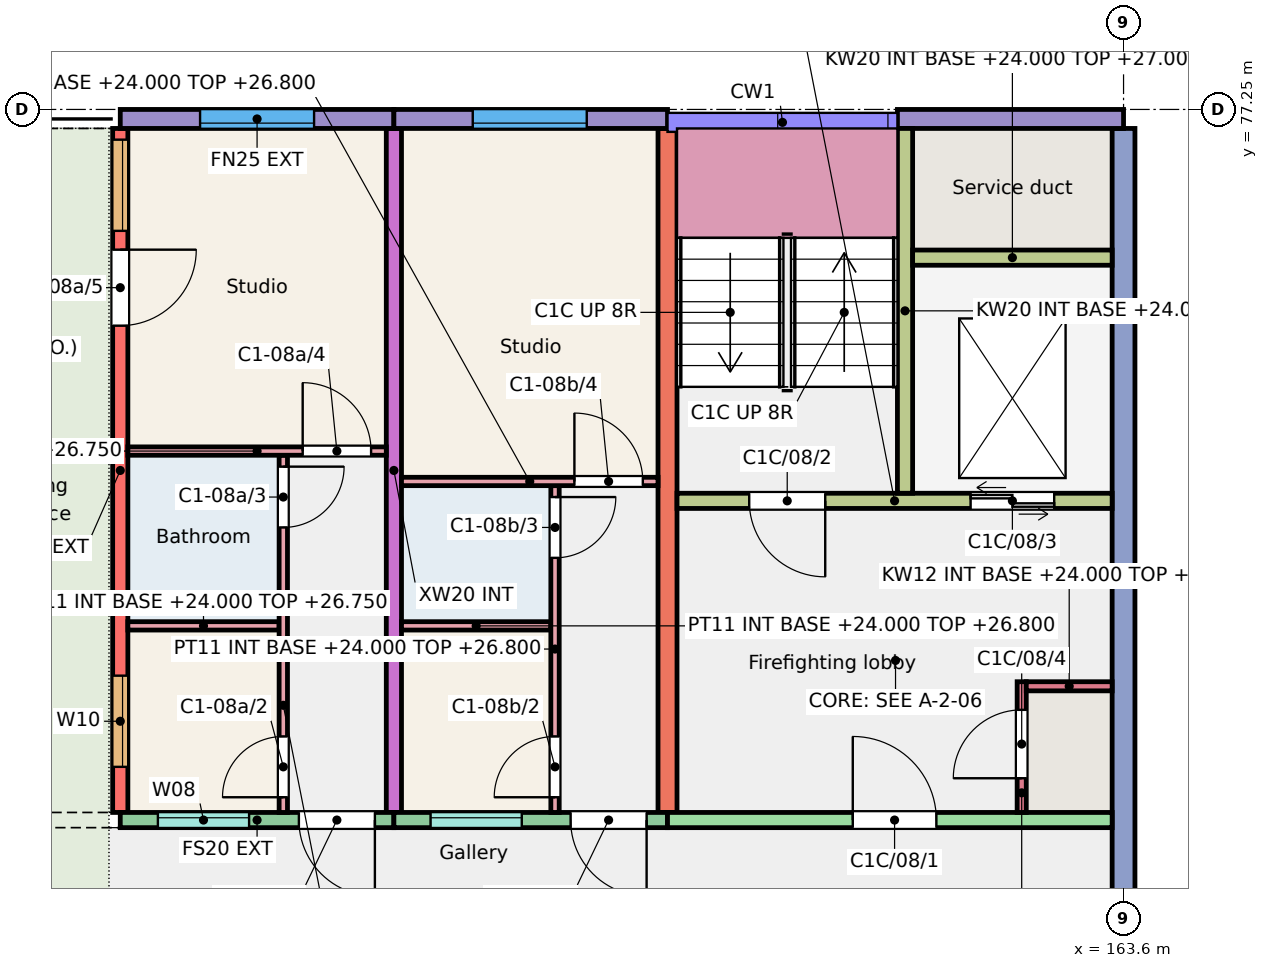
"""IFC4 building model, lengths in metres.
Left out: names, types, materials, properties, quantities, classifications, styles, units other than length and angle.
Written with IfcOpenShell. Run it as: python <this file> out.ifc"""

import sys

from ifc_helpers import new_model, si_unit, direction, frame, frame_2d, origin, place, context, subcontext, project, spatial, rectangle, extrude, element, fill, save


model = new_model("IFC4")
c1 = context("Model", 3, precision=1e-05, world=origin(), true_north=direction((0.0, 1.0)))
c2 = subcontext(c1, "Body", "Model", "MODEL_VIEW")
j1 = project(units=[si_unit("LENGTHUNIT", "METRE"), si_unit("PLANEANGLEUNIT", "RADIAN")], contexts=[c1])
p1 = place(None, origin())
s1 = spatial("IfcSite", under=j1, at=p1, CompositionType="ELEMENT")
p2 = place(p1, origin())
s2 = spatial("IfcBuilding", under=s1, at=p2, CompositionType="ELEMENT")
p3 = place(p2, frame((0.0, 0.0, 24.0)))
s3 = spatial("IfcBuildingStorey", under=s2, at=p3, CompositionType="ELEMENT", Elevation=24.0)
p4 = place(p3, frame((150.4, 68.0, 0.0), z_axis=(0.0, 0.0, 1.0), x_axis=(0.0, 1.0, 0.0)))
e1 = element("IfcWall", 1, at=p4, inside=s3, PredefinedType="SHEAR", context=c2, shape_type="SweptSolid", body=[
    extrude(rectangle(XDim=9.0, YDim=0.2, at=frame_2d((4.5, 0.0))), origin(), (0.0, 0.0, 1.0), 3.0),
])
p5 = place(p4, frame((0.6, 0.0, 0.9)))
e2 = element("IfcOpeningElement", 2, at=p5, cuts=e1, PredefinedType="OPENING", context=c2, shape_type="SweptSolid", body=[
    extrude(rectangle(XDim=1.2, YDim=1.5, at=frame_2d((0.6, 0.75))), frame((0.0, 0.11, 0.0), z_axis=(0.0, -1.0, 0.0), x_axis=(1.0, 0.0, 0.0)), (0.0, 0.0, 1.0), 0.22),
])
p6 = place(p4, frame((7.653, 0.0, 0.9)))
e3 = element("IfcOpeningElement", 3, at=p6, cuts=e1, PredefinedType="OPENING", context=c2, shape_type="SweptSolid", body=[
    extrude(rectangle(XDim=1.2, YDim=1.5, at=frame_2d((0.6, 0.75))), frame((0.0, 0.11, 0.0), z_axis=(0.0, -1.0, 0.0), x_axis=(1.0, 0.0, 0.0)), (0.0, 0.0, 1.0), 0.22),
])
p7 = place(p4, frame((6.405, 0.0, 0.0)))
e4 = element("IfcOpeningElement", 4, at=p7, cuts=e1, PredefinedType="OPENING", context=c2, shape_type="SweptSolid", body=[
    extrude(rectangle(XDim=1.0, YDim=2.1, at=frame_2d((0.5, 1.05))), frame((0.0, 0.11, 0.0), z_axis=(0.0, -1.0, 0.0), x_axis=(1.0, 0.0, 0.0)), (0.0, 0.0, 1.0), 0.22),
])
p8 = place(p3, frame((154.0, 68.0, 0.0), z_axis=(0.0, 0.0, 1.0), x_axis=(0.0, 1.0, 0.0)))
e5 = element("IfcWall", 5, at=p8, inside=s3, PredefinedType="SHEAR", context=c2, shape_type="SweptSolid", body=[
    extrude(rectangle(XDim=9.0, YDim=0.2, at=frame_2d((4.5, 0.0))), origin(), (0.0, 0.0, 1.0), 3.0),
])
p9 = place(p3, frame((157.6, 68.0, 0.0), z_axis=(0.0, 0.0, 1.0), x_axis=(0.0, 1.0, 0.0)))
e6 = element("IfcWall", 6, at=p9, inside=s3, PredefinedType="SHEAR", context=c2, shape_type="SweptSolid", body=[
    extrude(rectangle(XDim=9.0, YDim=0.25, at=frame_2d((4.5, 0.0))), origin(), (0.0, 0.0, 1.0), 3.0),
])
p10 = place(p3, frame((163.6, 66.0, 0.0), z_axis=(0.0, 0.0, 1.0), x_axis=(0.0, 1.0, 0.0)))
e7 = element("IfcWall", 7, at=p10, inside=s3, PredefinedType="SHEAR", context=c2, shape_type="SweptSolid", body=[
    extrude(rectangle(XDim=11.0, YDim=0.3, at=frame_2d((5.5, 0.0))), origin(), (0.0, 0.0, 1.0), 3.0),
])
p11 = place(p3, frame((150.4, 77.125, 0.0), z_axis=(0.0, 0.0, 1.0), x_axis=(1.0, 0.0, 0.0)))
e8 = element("IfcWall", 8, at=p11, inside=s3, PredefinedType="SOLIDWALL", context=c2, shape_type="SweptSolid", body=[
    extrude(rectangle(XDim=3.6, YDim=0.25, at=frame_2d((1.8, 0.0))), origin(), (0.0, 0.0, 1.0), 3.0),
])
p12 = place(p11, frame((1.05, 0.0, 0.9)))
e9 = element("IfcOpeningElement", 9, at=p12, cuts=e8, PredefinedType="OPENING", context=c2, shape_type="SweptSolid", body=[
    extrude(rectangle(XDim=1.5, YDim=1.5, at=frame_2d((0.75, 0.75))), frame((0.0, 0.135, 0.0), z_axis=(0.0, -1.0, 0.0), x_axis=(1.0, 0.0, 0.0)), (0.0, 0.0, 1.0), 0.27),
])
p13 = place(p3, frame((150.4, 67.9, 0.0), z_axis=(0.0, 0.0, 1.0), x_axis=(1.0, 0.0, 0.0)))
e10 = element("IfcWall", 10, at=p13, inside=s3, PredefinedType="SOLIDWALL", context=c2, shape_type="SweptSolid", body=[
    extrude(rectangle(XDim=3.6, YDim=0.2, at=frame_2d((1.8, 0.0))), origin(), (0.0, 0.0, 1.0), 3.0),
])
p14 = place(p13, frame((0.495, 0.0, 1.1)))
e11 = element("IfcOpeningElement", 11, at=p14, cuts=e10, PredefinedType="OPENING", context=c2, shape_type="SweptSolid", body=[
    extrude(rectangle(XDim=1.2, YDim=1.3, at=frame_2d((0.6, 0.65))), frame((0.0, 0.11, 0.0), z_axis=(0.0, -1.0, 0.0), x_axis=(1.0, 0.0, 0.0)), (0.0, 0.0, 1.0), 0.22),
])
p15 = place(p13, frame((2.35, 0.0, 0.0)))
e12 = element("IfcOpeningElement", 12, at=p15, cuts=e10, PredefinedType="OPENING", context=c2, shape_type="SweptSolid", body=[
    extrude(rectangle(XDim=1.0, YDim=2.1, at=frame_2d((0.5, 1.05))), frame((0.0, 0.11, 0.0), z_axis=(0.0, -1.0, 0.0), x_axis=(1.0, 0.0, 0.0)), (0.0, 0.0, 1.0), 0.22),
])
p16 = place(p3, frame((154.0, 77.125, 0.0), z_axis=(0.0, 0.0, 1.0), x_axis=(1.0, 0.0, 0.0)))
e13 = element("IfcWall", 13, at=p16, inside=s3, PredefinedType="SOLIDWALL", context=c2, shape_type="SweptSolid", body=[
    extrude(rectangle(XDim=3.6, YDim=0.25, at=frame_2d((1.8, 0.0))), origin(), (0.0, 0.0, 1.0), 3.0),
])
p17 = place(p16, frame((1.038, 0.0, 0.9)))
e14 = element("IfcOpeningElement", 14, at=p17, cuts=e13, PredefinedType="OPENING", context=c2, shape_type="SweptSolid", body=[
    extrude(rectangle(XDim=1.5, YDim=1.5, at=frame_2d((0.75, 0.75))), frame((0.0, 0.135, 0.0), z_axis=(0.0, -1.0, 0.0), x_axis=(1.0, 0.0, 0.0)), (0.0, 0.0, 1.0), 0.27),
])
p18 = place(p3, frame((154.0, 67.9, 0.0), z_axis=(0.0, 0.0, 1.0), x_axis=(1.0, 0.0, 0.0)))
e15 = element("IfcWall", 15, at=p18, inside=s3, PredefinedType="SOLIDWALL", context=c2, shape_type="SweptSolid", body=[
    extrude(rectangle(XDim=3.6, YDim=0.2, at=frame_2d((1.8, 0.0))), origin(), (0.0, 0.0, 1.0), 3.0),
])
p19 = place(p18, frame((0.482, 0.0, 1.1)))
e16 = element("IfcOpeningElement", 16, at=p19, cuts=e15, PredefinedType="OPENING", context=c2, shape_type="SweptSolid", body=[
    extrude(rectangle(XDim=1.2, YDim=1.3, at=frame_2d((0.6, 0.65))), frame((0.0, 0.11, 0.0), z_axis=(0.0, -1.0, 0.0), x_axis=(1.0, 0.0, 0.0)), (0.0, 0.0, 1.0), 0.22),
])
p20 = place(p18, frame((2.325, 0.0, 0.0)))
e17 = element("IfcOpeningElement", 17, at=p20, cuts=e15, PredefinedType="OPENING", context=c2, shape_type="SweptSolid", body=[
    extrude(rectangle(XDim=1.0, YDim=2.1, at=frame_2d((0.5, 1.05))), frame((0.0, 0.11, 0.0), z_axis=(0.0, -1.0, 0.0), x_axis=(1.0, 0.0, 0.0)), (0.0, 0.0, 1.0), 0.22),
])
p21 = place(p3, frame((160.625, 77.125, 0.0), z_axis=(0.0, 0.0, 1.0), x_axis=(1.0, 0.0, 0.0)))
e18 = element("IfcWall", 18, at=p21, inside=s3, PredefinedType="SOLIDWALL", context=c2, shape_type="SweptSolid", body=[
    extrude(rectangle(XDim=2.975, YDim=0.25, at=frame_2d((1.488, 0.0))), origin(), (0.0, 0.0, 1.0), 3.0),
])
p22 = place(p3, frame((157.6, 67.9, 0.0), z_axis=(0.0, 0.0, 1.0), x_axis=(1.0, 0.0, 0.0)))
e19 = element("IfcWall", 19, at=p22, inside=s3, PredefinedType="SHEAR", context=c2, shape_type="SweptSolid", body=[
    extrude(rectangle(XDim=5.85, YDim=0.2, at=frame_2d((2.925, 0.0))), origin(), (0.0, 0.0, 1.0), 3.0),
])
p23 = place(p22, frame((2.438, 0.0, 0.0)))
e20 = element("IfcOpeningElement", 20, at=p23, cuts=e19, PredefinedType="OPENING", context=c2, shape_type="SweptSolid", body=[
    extrude(rectangle(XDim=1.1, YDim=2.1, at=frame_2d((0.55, 1.05))), frame((0.0, 0.11, 0.0), z_axis=(0.0, -1.0, 0.0), x_axis=(1.0, 0.0, 0.0)), (0.0, 0.0, 1.0), 0.22),
])
p24 = place(p3, frame((157.725, 72.1, 0.0), z_axis=(0.0, 0.0, 1.0), x_axis=(1.0, 0.0, 0.0)))
e21 = element("IfcWall", 21, at=p24, inside=s3, PredefinedType="SHEAR", context=c2, shape_type="SweptSolid", body=[
    extrude(rectangle(XDim=5.725, YDim=0.2, at=frame_2d((2.862, 0.0))), origin(), (0.0, 0.0, 1.0), 3.0),
])
p25 = place(p24, frame((0.95, 0.0, 0.0)))
e22 = element("IfcOpeningElement", 22, at=p25, cuts=e21, PredefinedType="OPENING", context=c2, shape_type="SweptSolid", body=[
    extrude(rectangle(XDim=1.0, YDim=2.1, at=frame_2d((0.5, 1.05))), frame((0.0, 0.11, 0.0), z_axis=(0.0, -1.0, 0.0), x_axis=(1.0, 0.0, 0.0)), (0.0, 0.0, 1.0), 0.22),
])
p26 = place(p24, frame((3.863, 0.0, 0.0)))
e23 = element("IfcOpeningElement", 23, at=p26, cuts=e21, PredefinedType="OPENING", context=c2, shape_type="SweptSolid", body=[
    extrude(rectangle(XDim=1.1, YDim=2.1, at=frame_2d((0.55, 1.05))), frame((0.0, 0.11, 0.0), z_axis=(0.0, -1.0, 0.0), x_axis=(1.0, 0.0, 0.0)), (0.0, 0.0, 1.0), 0.22),
])
p27 = place(p3, frame((160.725, 72.2, 0.0), z_axis=(0.0, 0.0, 1.0), x_axis=(0.0, 1.0, 0.0)))
e24 = element("IfcWall", 24, at=p27, inside=s3, PredefinedType="SHEAR", context=c2, shape_type="SweptSolid", body=[
    extrude(rectangle(XDim=4.8, YDim=0.2, at=frame_2d((2.4, 0.0))), origin(), (0.0, 0.0, 1.0), 3.0),
])
p28 = place(p3, frame((160.825, 75.3, 0.0), z_axis=(0.0, 0.0, 1.0), x_axis=(1.0, 0.0, 0.0)))
e25 = element("IfcWall", 25, at=p28, inside=s3, PredefinedType="SHEAR", context=c2, shape_type="SweptSolid", body=[
    extrude(rectangle(XDim=2.625, YDim=0.2, at=frame_2d((1.312, 0.0))), origin(), (0.0, 0.0, 1.0), 3.0),
])
p29 = place(p3, frame((162.26, 68.0, 0.0), z_axis=(0.0, 0.0, 1.0), x_axis=(0.0, 1.0, 0.0)))
e26 = element("IfcWall", 26, at=p29, inside=s3, PredefinedType="SHEAR", context=c2, shape_type="SweptSolid", body=[
    extrude(rectangle(XDim=1.72, YDim=0.12, at=frame_2d((0.86, 0.0))), origin(), (0.0, 0.0, 1.0), 3.0),
])
p30 = place(p29, frame((0.45, 0.0, 0.0)))
e27 = element("IfcOpeningElement", 27, at=p30, cuts=e26, PredefinedType="OPENING", context=c2, shape_type="SweptSolid", body=[
    extrude(rectangle(XDim=0.9, YDim=2.1, at=frame_2d((0.45, 1.05))), frame((0.0, 0.07, 0.0), z_axis=(0.0, -1.0, 0.0), x_axis=(1.0, 0.0, 0.0)), (0.0, 0.0, 1.0), 0.14),
])
p31 = place(p3, frame((162.32, 69.66, 0.0), z_axis=(0.0, 0.0, 1.0), x_axis=(1.0, 0.0, 0.0)))
e28 = element("IfcWall", 28, at=p31, inside=s3, PredefinedType="SHEAR", context=c2, shape_type="SweptSolid", body=[
    extrude(rectangle(XDim=1.13, YDim=0.12, at=frame_2d((0.565, 0.0))), origin(), (0.0, 0.0, 1.0), 3.0),
])
p32 = place(p3, frame((150.5, 70.455, 0.0), z_axis=(0.0, 0.0, 1.0), x_axis=(1.0, 0.0, 0.0)))
e29 = element("IfcWall", 29, at=p32, inside=s3, PredefinedType="PARTITIONING", context=c2, shape_type="SweptSolid", body=[
    extrude(rectangle(XDim=1.99, YDim=0.11, at=frame_2d((0.995, 0.0))), origin(), (0.0, 0.0, 1.0), 2.75),
])
p33 = place(p3, frame((152.545, 68.0, 0.0), z_axis=(0.0, 0.0, 1.0), x_axis=(0.0, 1.0, 0.0)))
e30 = element("IfcWall", 30, at=p33, inside=s3, PredefinedType="PARTITIONING", context=c2, shape_type="SweptSolid", body=[
    extrude(rectangle(XDim=4.7, YDim=0.11, at=frame_2d((2.35, 0.0))), origin(), (0.0, 0.0, 1.0), 2.75),
])
p34 = place(p33, frame((0.2, 0.0, 0.0)))
e31 = element("IfcOpeningElement", 31, at=p34, cuts=e30, PredefinedType="OPENING", context=c2, shape_type="SweptSolid", body=[
    extrude(rectangle(XDim=0.8, YDim=2.1, at=frame_2d((0.4, 1.05))), frame((0.0, 0.065, 0.0), z_axis=(0.0, -1.0, 0.0), x_axis=(1.0, 0.0, 0.0)), (0.0, 0.0, 1.0), 0.13),
])
p35 = place(p33, frame((3.75, 0.0, 0.0)))
e32 = element("IfcOpeningElement", 32, at=p35, cuts=e30, PredefinedType="OPENING", context=c2, shape_type="SweptSolid", body=[
    extrude(rectangle(XDim=0.8, YDim=2.1, at=frame_2d((0.4, 1.05))), frame((0.0, 0.065, 0.0), z_axis=(0.0, -1.0, 0.0), x_axis=(1.0, 0.0, 0.0)), (0.0, 0.0, 1.0), 0.13),
])
p36 = place(p3, frame((150.5, 72.755, 0.0), z_axis=(0.0, 0.0, 1.0), x_axis=(1.0, 0.0, 0.0)))
e33 = element("IfcWall", 33, at=p36, inside=s3, PredefinedType="PARTITIONING", context=c2, shape_type="SweptSolid", body=[
    extrude(rectangle(XDim=3.4, YDim=0.11, at=frame_2d((1.7, 0.0))), origin(), (0.0, 0.0, 1.0), 2.75),
])
p37 = place(p36, frame((2.3, 0.0, 0.0)))
e34 = element("IfcOpeningElement", 34, at=p37, cuts=e33, PredefinedType="OPENING", context=c2, shape_type="SweptSolid", body=[
    extrude(rectangle(XDim=0.9, YDim=2.1, at=frame_2d((0.45, 1.05))), frame((0.0, 0.065, 0.0), z_axis=(0.0, -1.0, 0.0), x_axis=(1.0, 0.0, 0.0)), (0.0, 0.0, 1.0), 0.13),
])
p38 = place(p3, frame((154.1, 70.455, 0.0), z_axis=(0.0, 0.0, 1.0), x_axis=(1.0, 0.0, 0.0)))
e35 = element("IfcWall", 35, at=p38, inside=s3, PredefinedType="PARTITIONING", context=c2, shape_type="SweptSolid", body=[
    extrude(rectangle(XDim=1.965, YDim=0.11, at=frame_2d((0.982, 0.0))), origin(), (0.0, 0.0, 1.0), 2.8),
])
p39 = place(p3, frame((156.12, 68.0, 0.0), z_axis=(0.0, 0.0, 1.0), x_axis=(0.0, 1.0, 0.0)))
e36 = element("IfcWall", 36, at=p39, inside=s3, PredefinedType="PARTITIONING", context=c2, shape_type="SweptSolid", body=[
    extrude(rectangle(XDim=4.3, YDim=0.11, at=frame_2d((2.15, 0.0))), origin(), (0.0, 0.0, 1.0), 2.8),
])
p40 = place(p39, frame((0.2, 0.0, 0.0)))
e37 = element("IfcOpeningElement", 37, at=p40, cuts=e36, PredefinedType="OPENING", context=c2, shape_type="SweptSolid", body=[
    extrude(rectangle(XDim=0.8, YDim=2.1, at=frame_2d((0.4, 1.05))), frame((0.0, 0.065, 0.0), z_axis=(0.0, -1.0, 0.0), x_axis=(1.0, 0.0, 0.0)), (0.0, 0.0, 1.0), 0.13),
])
p41 = place(p39, frame((3.35, 0.0, 0.0)))
e38 = element("IfcOpeningElement", 38, at=p41, cuts=e36, PredefinedType="OPENING", context=c2, shape_type="SweptSolid", body=[
    extrude(rectangle(XDim=0.8, YDim=2.1, at=frame_2d((0.4, 1.05))), frame((0.0, 0.065, 0.0), z_axis=(0.0, -1.0, 0.0), x_axis=(1.0, 0.0, 0.0)), (0.0, 0.0, 1.0), 0.13),
])
p42 = place(p3, frame((154.1, 72.355, 0.0), z_axis=(0.0, 0.0, 1.0), x_axis=(1.0, 0.0, 0.0)))
e39 = element("IfcWall", 39, at=p42, inside=s3, PredefinedType="PARTITIONING", context=c2, shape_type="SweptSolid", body=[
    extrude(rectangle(XDim=3.375, YDim=0.11, at=frame_2d((1.688, 0.0))), origin(), (0.0, 0.0, 1.0), 2.8),
])
p43 = place(p42, frame((2.275, 0.0, 0.0)))
e40 = element("IfcOpeningElement", 40, at=p43, cuts=e39, PredefinedType="OPENING", context=c2, shape_type="SweptSolid", body=[
    extrude(rectangle(XDim=0.9, YDim=2.1, at=frame_2d((0.45, 1.05))), frame((0.0, 0.065, 0.0), z_axis=(0.0, -1.0, 0.0), x_axis=(1.0, 0.0, 0.0)), (0.0, 0.0, 1.0), 0.13),
])
p44 = place(p14, origin())
e41 = element("IfcWindow", 41, at=p44, inside=s3, PartitioningType="SINGLE_PANEL", PredefinedType="WINDOW", context=c2, shape_type="SweptSolid", body=[
    extrude(rectangle(XDim=1.2, YDim=1.3, at=frame_2d((0.6, 0.65))), frame((0.0, 0.06, 0.0), z_axis=(0.0, -1.0, 0.0), x_axis=(1.0, 0.0, 0.0)), (0.0, 0.0, 1.0), 0.06),
])
fill(e11, e41)
p45 = place(p12, origin())
e42 = element("IfcWindow", 42, at=p45, inside=s3, PartitioningType="SINGLE_PANEL", PredefinedType="WINDOW", context=c2, shape_type="SweptSolid", body=[
    extrude(rectangle(XDim=1.5, YDim=1.5, at=frame_2d((0.75, 0.75))), frame((0.0, -0.025, 0.0), z_axis=(0.0, -1.0, 0.0), x_axis=(1.0, 0.0, 0.0)), (0.0, 0.0, 1.0), 0.06),
])
fill(e9, e42)
p46 = place(p5, origin())
e43 = element("IfcWindow", 43, at=p46, inside=s3, PartitioningType="SINGLE_PANEL", PredefinedType="WINDOW", context=c2, shape_type="SweptSolid", body=[
    extrude(rectangle(XDim=1.2, YDim=1.5, at=frame_2d((0.6, 0.75))), frame((0.0, 0.0, 0.0), z_axis=(0.0, -1.0, 0.0), x_axis=(1.0, 0.0, 0.0)), (0.0, 0.0, 1.0), 0.06),
])
fill(e2, e43)
p47 = place(p6, origin())
e44 = element("IfcWindow", 44, at=p47, inside=s3, PartitioningType="SINGLE_PANEL", PredefinedType="WINDOW", context=c2, shape_type="SweptSolid", body=[
    extrude(rectangle(XDim=1.2, YDim=1.5, at=frame_2d((0.6, 0.75))), frame((0.0, 0.0, 0.0), z_axis=(0.0, -1.0, 0.0), x_axis=(1.0, 0.0, 0.0)), (0.0, 0.0, 1.0), 0.06),
])
fill(e3, e44)
p48 = place(p19, origin())
e45 = element("IfcWindow", 45, at=p48, inside=s3, PartitioningType="SINGLE_PANEL", PredefinedType="WINDOW", context=c2, shape_type="SweptSolid", body=[
    extrude(rectangle(XDim=1.2, YDim=1.3, at=frame_2d((0.6, 0.65))), frame((0.0, 0.06, 0.0), z_axis=(0.0, -1.0, 0.0), x_axis=(1.0, 0.0, 0.0)), (0.0, 0.0, 1.0), 0.06),
])
fill(e16, e45)
p49 = place(p17, origin())
e46 = element("IfcWindow", 46, at=p49, inside=s3, PartitioningType="SINGLE_PANEL", PredefinedType="WINDOW", context=c2, shape_type="SweptSolid", body=[
    extrude(rectangle(XDim=1.5, YDim=1.5, at=frame_2d((0.75, 0.75))), frame((0.0, -0.025, 0.0), z_axis=(0.0, -1.0, 0.0), x_axis=(1.0, 0.0, 0.0)), (0.0, 0.0, 1.0), 0.06),
])
fill(e14, e46)
p50 = place(p15, origin())
e47 = element("IfcDoor", 47, at=p50, inside=s3, OperationType="SINGLE_SWING_RIGHT", PredefinedType="DOOR", context=c2, shape_type="SweptSolid", body=[
    extrude(rectangle(XDim=1.0, YDim=2.1, at=frame_2d((0.5, 1.05))), frame((0.0, 0.025, 0.0), z_axis=(0.0, -1.0, 0.0), x_axis=(1.0, 0.0, 0.0)), (0.0, 0.0, 1.0), 0.05),
])
fill(e12, e47)
p51 = place(p34, origin())
e48 = element("IfcDoor", 48, at=p51, inside=s3, OperationType="SINGLE_SWING_LEFT", PredefinedType="DOOR", context=c2, shape_type="SweptSolid", body=[
    extrude(rectangle(XDim=0.8, YDim=2.1, at=frame_2d((0.4, 1.05))), frame((0.0, 0.025, 0.0), z_axis=(0.0, -1.0, 0.0), x_axis=(1.0, 0.0, 0.0)), (0.0, 0.0, 1.0), 0.05),
])
fill(e31, e48)
p52 = place(p35, origin())
e49 = element("IfcDoor", 49, at=p52, inside=s3, OperationType="SINGLE_SWING_RIGHT", PredefinedType="DOOR", context=c2, shape_type="SweptSolid", body=[
    extrude(rectangle(XDim=0.8, YDim=2.1, at=frame_2d((0.4, 1.05))), frame((0.0, 0.025, 0.0), z_axis=(0.0, -1.0, 0.0), x_axis=(1.0, 0.0, 0.0)), (0.0, 0.0, 1.0), 0.05),
])
fill(e32, e49)
p53 = place(p37, origin())
e50 = element("IfcDoor", 50, at=p53, inside=s3, OperationType="SINGLE_SWING_LEFT", PredefinedType="DOOR", context=c2, shape_type="SweptSolid", body=[
    extrude(rectangle(XDim=0.9, YDim=2.1, at=frame_2d((0.45, 1.05))), frame((0.0, 0.025, 0.0), z_axis=(0.0, -1.0, 0.0), x_axis=(1.0, 0.0, 0.0)), (0.0, 0.0, 1.0), 0.05),
])
fill(e34, e50)
p54 = place(p7, origin())
e51 = element("IfcDoor", 51, at=p54, inside=s3, OperationType="SINGLE_SWING_RIGHT", PredefinedType="DOOR", context=c2, shape_type="SweptSolid", body=[
    extrude(rectangle(XDim=1.0, YDim=2.1, at=frame_2d((0.5, 1.05))), frame((0.0, 0.025, 0.0), z_axis=(0.0, -1.0, 0.0), x_axis=(1.0, 0.0, 0.0)), (0.0, 0.0, 1.0), 0.05),
])
fill(e4, e51)
p55 = place(p20, origin())
e52 = element("IfcDoor", 52, at=p55, inside=s3, OperationType="SINGLE_SWING_RIGHT", PredefinedType="DOOR", context=c2, shape_type="SweptSolid", body=[
    extrude(rectangle(XDim=1.0, YDim=2.1, at=frame_2d((0.5, 1.05))), frame((0.0, 0.025, 0.0), z_axis=(0.0, -1.0, 0.0), x_axis=(1.0, 0.0, 0.0)), (0.0, 0.0, 1.0), 0.05),
])
fill(e17, e52)
p56 = place(p40, origin())
e53 = element("IfcDoor", 53, at=p56, inside=s3, OperationType="SINGLE_SWING_LEFT", PredefinedType="DOOR", context=c2, shape_type="SweptSolid", body=[
    extrude(rectangle(XDim=0.8, YDim=2.1, at=frame_2d((0.4, 1.05))), frame((0.0, 0.025, 0.0), z_axis=(0.0, -1.0, 0.0), x_axis=(1.0, 0.0, 0.0)), (0.0, 0.0, 1.0), 0.05),
])
fill(e37, e53)
p57 = place(p41, origin())
e54 = element("IfcDoor", 54, at=p57, inside=s3, OperationType="SINGLE_SWING_RIGHT", PredefinedType="DOOR", context=c2, shape_type="SweptSolid", body=[
    extrude(rectangle(XDim=0.8, YDim=2.1, at=frame_2d((0.4, 1.05))), frame((0.0, 0.025, 0.0), z_axis=(0.0, -1.0, 0.0), x_axis=(1.0, 0.0, 0.0)), (0.0, 0.0, 1.0), 0.05),
])
fill(e38, e54)
p58 = place(p43, origin())
e55 = element("IfcDoor", 55, at=p58, inside=s3, OperationType="SINGLE_SWING_LEFT", PredefinedType="DOOR", context=c2, shape_type="SweptSolid", body=[
    extrude(rectangle(XDim=0.9, YDim=2.1, at=frame_2d((0.45, 1.05))), frame((0.0, 0.025, 0.0), z_axis=(0.0, -1.0, 0.0), x_axis=(1.0, 0.0, 0.0)), (0.0, 0.0, 1.0), 0.05),
])
fill(e40, e55)
p59 = place(p23, origin())
e56 = element("IfcDoor", 56, at=p59, inside=s3, OperationType="SINGLE_SWING_LEFT", PredefinedType="DOOR", context=c2, shape_type="SweptSolid", body=[
    extrude(rectangle(XDim=1.1, YDim=2.1, at=frame_2d((0.55, 1.05))), frame((0.0, 0.025, 0.0), z_axis=(0.0, -1.0, 0.0), x_axis=(1.0, 0.0, 0.0)), (0.0, 0.0, 1.0), 0.05),
])
fill(e20, e56)
p60 = place(p25, origin())
e57 = element("IfcDoor", 57, at=p60, inside=s3, OperationType="SINGLE_SWING_RIGHT", PredefinedType="DOOR", context=c2, shape_type="SweptSolid", body=[
    extrude(rectangle(XDim=1.0, YDim=2.1, at=frame_2d((0.5, 1.05))), frame((0.0, 0.025, 0.0), z_axis=(0.0, -1.0, 0.0), x_axis=(1.0, 0.0, 0.0)), (0.0, 0.0, 1.0), 0.05),
])
fill(e22, e57)
p61 = place(p26, origin())
e58 = element("IfcDoor", 58, at=p61, inside=s3, OperationType="DOUBLE_DOOR_SLIDING", PredefinedType="DOOR", context=c2, shape_type="SweptSolid", body=[
    extrude(rectangle(XDim=1.1, YDim=2.1, at=frame_2d((0.55, 1.05))), frame((0.0, 0.025, 0.0), z_axis=(0.0, -1.0, 0.0), x_axis=(1.0, 0.0, 0.0)), (0.0, 0.0, 1.0), 0.05),
])
fill(e23, e58)
p62 = place(p30, origin())
e59 = element("IfcDoor", 59, at=p62, inside=s3, OperationType="SINGLE_SWING_LEFT", PredefinedType="DOOR", context=c2, shape_type="SweptSolid", body=[
    extrude(rectangle(XDim=0.9, YDim=2.1, at=frame_2d((0.45, 1.05))), frame((0.0, 0.025, 0.0), z_axis=(0.0, -1.0, 0.0), x_axis=(1.0, 0.0, 0.0)), (0.0, 0.0, 1.0), 0.05),
])
fill(e27, e59)
save(model, sys.argv[1])
